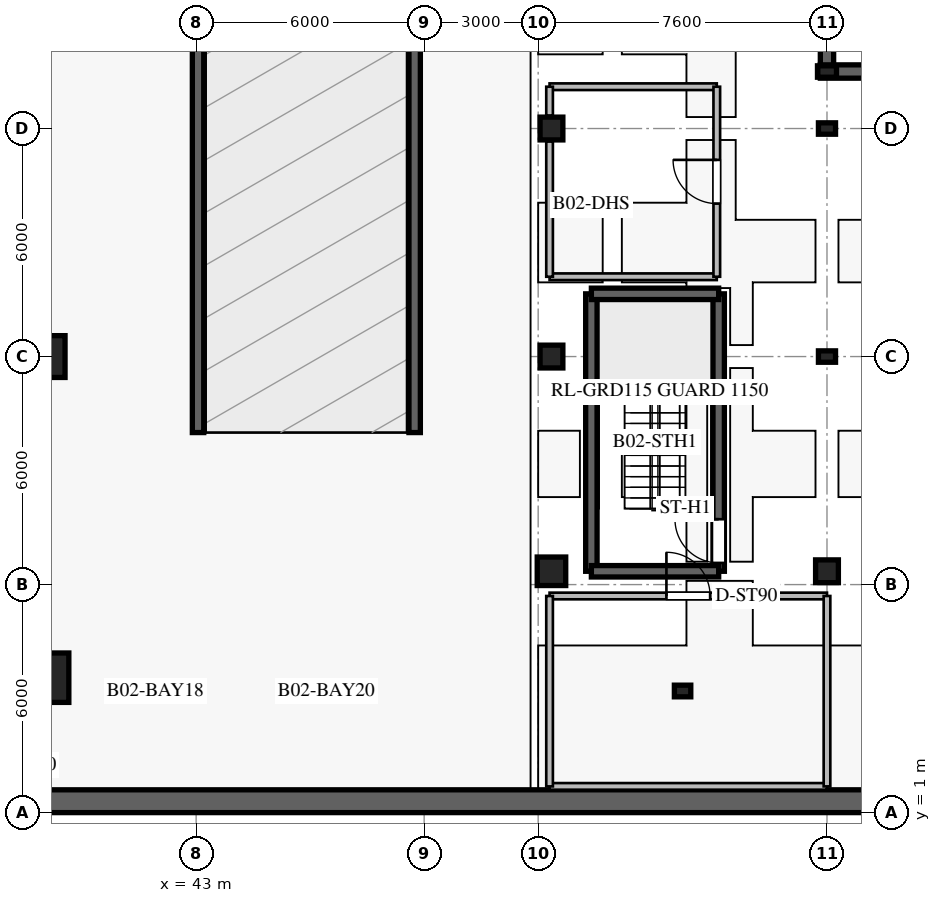
"""IFC4 building model, lengths in metres.
Left out: names, types, materials, properties, quantities, classifications, styles, units other than length and angle.
Written with IfcOpenShell. Run it as: python <this file> out.ifc"""

import sys

from ifc_helpers import new_model, si_unit, direction, frame, frame_2d, origin, origin_2d, place, context, subcontext, project, spatial, rectangle, i_section, extrude, element, fill, save


model = new_model("IFC4")
c1 = context("Model", 3, precision=1e-05, world=origin(), true_north=direction((0.0, 1.0)))
c2 = subcontext(c1, "Body", "Model", "MODEL_VIEW")
j1 = project(units=[si_unit("LENGTHUNIT", "METRE"), si_unit("PLANEANGLEUNIT", "RADIAN")], contexts=[c1])
p1 = place(None, origin())
s1 = spatial("IfcSite", under=j1, at=p1, CompositionType="ELEMENT")
p2 = place(p1, origin())
s2 = spatial("IfcBuilding", under=s1, at=p2, CompositionType="ELEMENT")
p3 = place(p2, frame((0.0, 0.0, -8.4)))
s3 = spatial("IfcBuildingStorey", under=s2, at=p3, CompositionType="ELEMENT", Elevation=-8.4)
for number, where, z_axis, x_axis in (
    (1, (43.05, 11.0, 0.0), (0.0, 0.0, 1.0), (0.0, 1.0, 0.0)),
    (2, (48.75, 11.0, 0.0), (0.0, 0.0, 1.0), (0.0, 1.0, 0.0)),
):
    element("IfcWall", number, at=place(p3, frame(where, z_axis=z_axis, x_axis=x_axis)), inside=s3, PredefinedType="SOLIDWALL", context=c2, shape_type="SweptSolid", body=[
        extrude(rectangle(XDim=28.5, YDim=0.3, at=frame_2d((14.25, 0.0))), origin(), (0.0, 0.0, 1.0), 3.88),
    ])
p4 = place(p3, frame((1.0, 1.3, 0.0), z_axis=(0.0, 0.0, 1.0), x_axis=(1.0, 0.0, 0.0)))
e3 = element("IfcWall", 3, at=p4, inside=s3, PredefinedType="USERDEFINED", context=c2, shape_type="SweptSolid", body=[
    extrude(rectangle(XDim=74.0, YDim=0.6, at=frame_2d((37.0, 0.0))), origin(), (0.0, 0.0, 1.0), 3.88),
])
p5 = place(p3, frame((59.425, 20.5, 0.0), z_axis=(0.0, 0.0, 1.0), x_axis=(1.0, 0.0, 0.0)))
e4 = element("IfcWall", 4, at=p5, inside=s3, PredefinedType="SHEAR", context=c2, shape_type="SweptSolid", body=[
    extrude(rectangle(XDim=8.15, YDim=0.35, at=frame_2d((4.075, 0.0))), origin(), (0.0, 0.0, 1.0), 3.88),
])
p6 = place(p5, frame((4.2, 0.0, 0.0)))
e5 = element("IfcOpeningElement", 5, at=p6, cuts=e4, PredefinedType="OPENING", context=c2, shape_type="SweptSolid", body=[
    extrude(rectangle(XDim=1.5, YDim=2.2, at=frame_2d((0.75, 1.1))), frame((0.0, 0.185, 0.0), z_axis=(0.0, -1.0, 0.0), x_axis=(1.0, 0.0, 0.0)), (0.0, 0.0, 1.0), 0.37),
])
p7 = place(p3, frame((59.6, 29.325, 0.0), z_axis=(0.0, 0.0, 1.0), x_axis=(0.0, -1.0, 0.0)))
e6 = element("IfcWall", 6, at=p7, inside=s3, PredefinedType="SHEAR", context=c2, shape_type="SweptSolid", body=[
    extrude(rectangle(XDim=8.65, YDim=0.35, at=frame_2d((4.325, 0.0))), origin(), (0.0, 0.0, 1.0), 3.88),
])
p8 = place(p3, frame((59.6, 20.5, 0.0), z_axis=(0.0, 0.0, 1.0), x_axis=(1.0, 0.0, 0.0)))
e7 = element("IfcColumn", 7, at=p8, inside=s3, PredefinedType="COLUMN", context=c2, shape_type="SweptSolid", body=[
    extrude(i_section(OverallWidth=0.3, OverallDepth=0.5, WebThickness=0.014, FlangeThickness=0.028, at=origin_2d()), origin(), (0.0, 0.0, 1.0), 4.2),
])
p9 = place(p3, frame((56.75, 7.35, 0.0), z_axis=(0.0, 0.0, 1.0), x_axis=(0.0, 1.0, 0.0)))
e8 = element("IfcWall", 8, at=p9, inside=s3, PredefinedType="SOLIDWALL", context=c2, shape_type="SweptSolid", body=[
    extrude(rectangle(XDim=7.3, YDim=0.3, at=frame_2d((3.65, 0.0))), origin(), (0.0, 0.0, 1.0), 3.88),
])
p10 = place(p9, frame((0.22, 0.0, 0.0)))
e9 = element("IfcOpeningElement", 9, at=p10, cuts=e8, PredefinedType="OPENING", context=c2, shape_type="SweptSolid", body=[
    extrude(rectangle(XDim=1.15, YDim=2.2, at=frame_2d((0.575, 1.1))), frame((0.0, 0.16, 0.0), z_axis=(0.0, -1.0, 0.0), x_axis=(1.0, 0.0, 0.0)), (0.0, 0.0, 1.0), 0.32),
])
p11 = place(p3, frame((53.4, 7.35, 0.0), z_axis=(0.0, 0.0, 1.0), x_axis=(0.0, 1.0, 0.0)))
e10 = element("IfcWall", 10, at=p11, inside=s3, PredefinedType="SOLIDWALL", context=c2, shape_type="SweptSolid", body=[
    extrude(rectangle(XDim=7.3, YDim=0.3, at=frame_2d((3.65, 0.0))), origin(), (0.0, 0.0, 1.0), 3.88),
])
for number, where, z_axis, x_axis in (
    (11, (53.4, 14.65, 0.0), (0.0, 0.0, 1.0), (1.0, 0.0, 0.0)),
    (12, (53.4, 7.35, 0.0), (0.0, 0.0, 1.0), (1.0, 0.0, 0.0)),
):
    element("IfcWall", number, at=place(p3, frame(where, z_axis=z_axis, x_axis=x_axis)), inside=s3, PredefinedType="SOLIDWALL", context=c2, shape_type="SweptSolid", body=[
        extrude(rectangle(XDim=3.35, YDim=0.3, at=frame_2d((1.675, 0.0))), origin(), (0.0, 0.0, 1.0), 3.88),
    ])
p12 = place(p3, frame((43.2, 21.3, 0.0), z_axis=(0.0, 0.0, 1.0), x_axis=(1.0, 0.0, 0.0)))
e13 = element("IfcColumn", 13, at=p12, inside=s3, PredefinedType="COLUMN", context=c2, shape_type="SweptSolid", body=[
    extrude(i_section(OverallWidth=0.303, OverallDepth=0.814, WebThickness=0.021, FlangeThickness=0.04, at=origin_2d()), origin(), (0.0, 0.0, 1.0), 4.2),
])
p13 = place(p3, frame((39.0, 4.55, 0.0), z_axis=(0.0, 0.0, 1.0), x_axis=(1.0, 0.0, 0.0)))
e14 = element("IfcColumn", 14, at=p13, inside=s3, PredefinedType="COLUMN", context=c2, shape_type="SweptSolid", body=[
    extrude(rectangle(XDim=1.3, YDim=1.3, at=origin_2d()), origin(), (0.0, 0.0, 1.0), 4.2),
])
p14 = place(p3, frame((39.0, 13.0, 0.0), z_axis=(0.0, 0.0, 1.0), x_axis=(1.0, 0.0, 0.0)))
e15 = element("IfcColumn", 15, at=p14, inside=s3, PredefinedType="COLUMN", context=c2, shape_type="SweptSolid", body=[
    extrude(rectangle(XDim=1.1, YDim=1.1, at=origin_2d()), origin(), (0.0, 0.0, 1.0), 4.2),
])
p15 = place(p3, frame((55.8, 4.2, 0.0), z_axis=(0.0, 0.0, 1.0), x_axis=(1.0, 0.0, 0.0)))
e16 = element("IfcColumn", 16, at=p15, inside=s3, PredefinedType="COLUMN", context=c2, shape_type="SweptSolid", body=[
    extrude(i_section(OverallWidth=0.307, OverallDepth=0.432, WebThickness=0.021, FlangeThickness=0.04, at=origin_2d()), origin(), (0.0, 0.0, 1.0), 4.2),
])
p16 = place(p3, frame((52.35, 7.35, 0.0), z_axis=(0.0, 0.0, 1.0), x_axis=(1.0, 0.0, 0.0)))
e17 = element("IfcColumn", 17, at=p16, inside=s3, PredefinedType="COLUMN", context=c2, shape_type="SweptSolid", body=[
    extrude(rectangle(XDim=0.75, YDim=0.75, at=origin_2d()), origin(), (0.0, 0.0, 1.0), 4.2),
])
for number, where, z_axis, x_axis in (
    (18, (52.35, 13.0, 0.0), (0.0, 0.0, 1.0), (1.0, 0.0, 0.0)),
    (19, (52.35, 19.0, 0.0), (0.0, 0.0, 1.0), (1.0, 0.0, 0.0)),
    (20, (59.6, 7.35, 0.0), (0.0, 0.0, 1.0), (1.0, 0.0, 0.0)),
):
    element("IfcColumn", number, at=place(p3, frame(where, z_axis=z_axis, x_axis=x_axis)), inside=s3, PredefinedType="COLUMN", context=c2, shape_type="SweptSolid", body=[
        extrude(rectangle(XDim=0.6, YDim=0.6, at=origin_2d()), origin(), (0.0, 0.0, 1.0), 4.2),
    ])
for number, where, z_axis, x_axis in (
    (21, (59.6, 13.0, 0.0), (0.0, 0.0, 1.0), (1.0, 0.0, 0.0)),
    (22, (59.6, 19.0, 0.0), (0.0, 0.0, 1.0), (1.0, 0.0, 0.0)),
):
    element("IfcColumn", number, at=place(p3, frame(where, z_axis=z_axis, x_axis=x_axis)), inside=s3, PredefinedType="COLUMN", context=c2, shape_type="SweptSolid", body=[
        extrude(i_section(OverallWidth=0.3, OverallDepth=0.45, WebThickness=0.014, FlangeThickness=0.026, at=origin_2d()), origin(), (0.0, 0.0, 1.0), 4.2),
    ])
p17 = place(p3, frame((52.3, 6.7, 0.0), z_axis=(0.0, 0.0, 1.0), x_axis=(1.0, 0.0, 0.0)))
e23 = element("IfcWall", 23, at=p17, inside=s3, PredefinedType="PARTITIONING", context=c2, shape_type="SweptSolid", body=[
    extrude(rectangle(XDim=7.3, YDim=0.175, at=frame_2d((3.65, 0.0))), origin(), (0.0, 0.0, 1.0), 3.88),
])
p18 = place(p17, frame((3.075, 0.0, 0.0)))
e24 = element("IfcOpeningElement", 24, at=p18, cuts=e23, PredefinedType="OPENING", context=c2, shape_type="SweptSolid", body=[
    extrude(rectangle(XDim=1.15, YDim=2.2, at=frame_2d((0.575, 1.1))), frame((0.0, 0.098, 0.0), z_axis=(0.0, -1.0, 0.0), x_axis=(1.0, 0.0, 0.0)), (0.0, 0.0, 1.0), 0.195),
])
p19 = place(p3, frame((52.3, 1.69, 0.0), z_axis=(0.0, 0.0, 1.0), x_axis=(1.0, 0.0, 0.0)))
e25 = element("IfcWall", 25, at=p19, inside=s3, PredefinedType="PARTITIONING", context=c2, shape_type="SweptSolid", body=[
    extrude(rectangle(XDim=7.3, YDim=0.175, at=frame_2d((3.65, 0.0))), origin(), (0.0, 0.0, 1.0), 3.88),
])
for number, where, z_axis, x_axis in (
    (26, (52.3, 1.69, 0.0), (0.0, 0.0, 1.0), (0.0, 1.0, 0.0)),
    (27, (59.6, 1.69, 0.0), (0.0, 0.0, 1.0), (0.0, 1.0, 0.0)),
):
    element("IfcWall", number, at=place(p3, frame(where, z_axis=z_axis, x_axis=x_axis)), inside=s3, PredefinedType="PARTITIONING", context=c2, shape_type="SweptSolid", body=[
        extrude(rectangle(XDim=5.01, YDim=0.175, at=frame_2d((2.505, 0.0))), origin(), (0.0, 0.0, 1.0), 3.88),
    ])
for number, where, z_axis, x_axis in (
    (28, (52.3, 20.1, 0.0), (0.0, 0.0, 1.0), (1.0, 0.0, 0.0)),
    (29, (52.3, 15.1, 0.0), (0.0, 0.0, 1.0), (1.0, 0.0, 0.0)),
):
    element("IfcWall", number, at=place(p3, frame(where, z_axis=z_axis, x_axis=x_axis)), inside=s3, PredefinedType="PARTITIONING", context=c2, shape_type="SweptSolid", body=[
        extrude(rectangle(XDim=4.4, YDim=0.175, at=frame_2d((2.2, 0.0))), origin(), (0.0, 0.0, 1.0), 3.52),
    ])
p20 = place(p3, frame((52.3, 15.1, 0.0), z_axis=(0.0, 0.0, 1.0), x_axis=(0.0, 1.0, 0.0)))
e30 = element("IfcWall", 30, at=p20, inside=s3, PredefinedType="PARTITIONING", context=c2, shape_type="SweptSolid", body=[
    extrude(rectangle(XDim=3.56, YDim=0.175, at=frame_2d((1.78, 0.0))), origin(), (0.0, 0.0, 1.0), 3.52),
])
p21 = place(p3, frame((52.3, 19.34, 0.0), z_axis=(0.0, 0.0, 1.0), x_axis=(0.0, 1.0, 0.0)))
e31 = element("IfcWall", 31, at=p21, inside=s3, PredefinedType="PARTITIONING", context=c2, shape_type="SweptSolid", body=[
    extrude(rectangle(XDim=0.76, YDim=0.175, at=frame_2d((0.38, 0.0))), origin(), (0.0, 0.0, 1.0), 3.52),
])
p22 = place(p3, frame((56.7, 15.1, 0.0), z_axis=(0.0, 0.0, 1.0), x_axis=(0.0, 1.0, 0.0)))
e32 = element("IfcWall", 32, at=p22, inside=s3, PredefinedType="PARTITIONING", context=c2, shape_type="SweptSolid", body=[
    extrude(rectangle(XDim=5.0, YDim=0.175, at=frame_2d((2.5, 0.0))), origin(), (0.0, 0.0, 1.0), 3.52),
])
p23 = place(p22, frame((1.925, 0.0, 0.0)))
e33 = element("IfcOpeningElement", 33, at=p23, cuts=e32, PredefinedType="OPENING", context=c2, shape_type="SweptSolid", body=[
    extrude(rectangle(XDim=1.15, YDim=2.2, at=frame_2d((0.575, 1.1))), frame((0.0, 0.098, 0.0), z_axis=(0.0, -1.0, 0.0), x_axis=(1.0, 0.0, 0.0)), (0.0, 0.0, 1.0), 0.195),
])
p24 = place(p10, origin())
e34 = element("IfcDoor", 34, at=p24, inside=s3, OperationType="SINGLE_SWING_RIGHT", PredefinedType="DOOR", context=c2, shape_type="SweptSolid", body=[
    extrude(rectangle(XDim=1.15, YDim=2.2, at=frame_2d((0.575, 1.1))), frame((0.0, 0.025, 0.0), z_axis=(0.0, -1.0, 0.0), x_axis=(1.0, 0.0, 0.0)), (0.0, 0.0, 1.0), 0.05),
])
fill(e9, e34)
p25 = place(p18, origin())
e35 = element("IfcDoor", 35, at=p25, inside=s3, OperationType="SINGLE_SWING_LEFT", PredefinedType="DOOR", context=c2, shape_type="SweptSolid", body=[
    extrude(rectangle(XDim=1.15, YDim=2.2, at=frame_2d((0.575, 1.1))), frame((0.0, 0.025, 0.0), z_axis=(0.0, -1.0, 0.0), x_axis=(1.0, 0.0, 0.0)), (0.0, 0.0, 1.0), 0.05),
])
fill(e24, e35)
p26 = place(p23, origin())
e36 = element("IfcDoor", 36, at=p26, inside=s3, OperationType="SINGLE_SWING_RIGHT", PredefinedType="DOOR", context=c2, shape_type="SweptSolid", body=[
    extrude(rectangle(XDim=1.15, YDim=2.2, at=frame_2d((0.575, 1.1))), frame((0.0, 0.025, 0.0), z_axis=(0.0, -1.0, 0.0), x_axis=(1.0, 0.0, 0.0)), (0.0, 0.0, 1.0), 0.05),
])
fill(e33, e36)
save(model, sys.argv[1])
